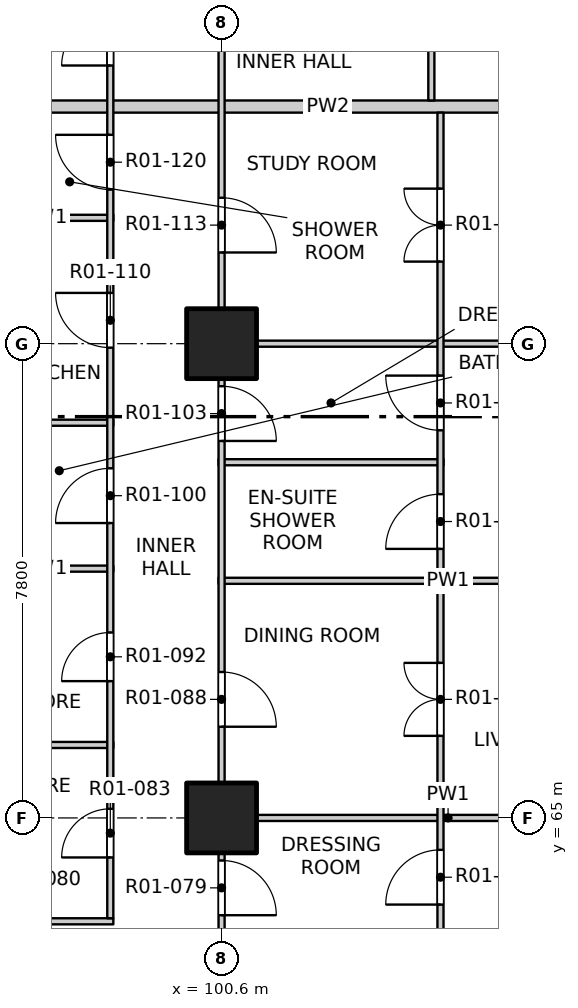
"""IFC4 building model, lengths in metres.
Left out: names, types, materials, properties, quantities, classifications, styles, units other than length and angle.
Written with IfcOpenShell. Run it as: python <this file> out.ifc"""

import sys

from ifc_helpers import new_model, si_unit, direction, frame, frame_2d, origin, origin_2d, place, context, subcontext, project, spatial, rectangle, extrude, element, fill, save


model = new_model("IFC4")
c1 = context("Model", 3, precision=1e-05, world=origin(), true_north=direction((0.0, 1.0)))
c2 = subcontext(c1, "Body", "Model", "MODEL_VIEW")
j1 = project(units=[si_unit("LENGTHUNIT", "METRE"), si_unit("PLANEANGLEUNIT", "RADIAN")], contexts=[c1])
p1 = place(None, origin())
s1 = spatial("IfcSite", under=j1, at=p1, CompositionType="ELEMENT")
p2 = place(p1, origin())
s2 = spatial("IfcBuilding", under=s1, at=p2, CompositionType="ELEMENT")
p3 = place(p2, frame((0.0, 0.0, 19.5)))
s3 = spatial("IfcBuildingStorey", under=s2, at=p3, CompositionType="ELEMENT", Elevation=19.5)
for number, where, z_axis, x_axis in (
    (1, (100.6, 65.0, -0.25), (0.0, 0.0, 1.0), (1.0, 0.0, 0.0)),
    (2, (100.6, 72.8, -0.25), (0.0, 0.0, 1.0), (1.0, 0.0, 0.0)),
):
    element("IfcColumn", number, at=place(p3, frame(where, z_axis=z_axis, x_axis=x_axis)), inside=s3, PredefinedType="COLUMN", context=c2, shape_type="SweptSolid", body=[
        extrude(rectangle(XDim=1.15, YDim=1.15, at=origin_2d()), origin(), (0.0, 0.0, 1.0), 3.4),
    ])
p4 = place(p3, frame((96.6, 63.3, 0.0), z_axis=(0.0, 0.0, 1.0), x_axis=(1.0, 0.0, 0.0)))
e3 = element("IfcWall", 3, at=p4, inside=s3, PredefinedType="PARTITIONING", context=c2, shape_type="SweptSolid", body=[
    extrude(rectangle(XDim=2.22, YDim=0.1, at=frame_2d((1.11, 0.0))), origin(), (0.0, 0.0, 1.0), 3.15),
])
p5 = place(p3, frame((100.55, 65.0, 0.0), z_axis=(0.0, 0.0, 1.0), x_axis=(1.0, 0.0, 0.0)))
e4 = element("IfcWall", 4, at=p5, inside=s3, PredefinedType="PARTITIONING", context=c2, shape_type="SweptSolid", body=[
    extrude(rectangle(XDim=7.55, YDim=0.1, at=frame_2d((3.775, 0.0))), origin(), (0.0, 0.0, 1.0), 2.55),
])
p6 = place(p3, frame((96.6, 66.2, 0.0), z_axis=(0.0, 0.0, 1.0), x_axis=(1.0, 0.0, 0.0)))
e5 = element("IfcWall", 5, at=p6, inside=s3, PredefinedType="PARTITIONING", context=c2, shape_type="SweptSolid", body=[
    extrude(rectangle(XDim=2.22, YDim=0.1, at=frame_2d((1.11, 0.0))), origin(), (0.0, 0.0, 1.0), 3.15),
])
p7 = place(p3, frame((100.55, 68.9, 0.0), z_axis=(0.0, 0.0, 1.0), x_axis=(1.0, 0.0, 0.0)))
e6 = element("IfcWall", 6, at=p7, inside=s3, PredefinedType="PARTITIONING", context=c2, shape_type="SweptSolid", body=[
    extrude(rectangle(XDim=7.55, YDim=0.1, at=frame_2d((3.775, 0.0))), origin(), (0.0, 0.0, 1.0), 3.15),
])
p8 = place(p3, frame((96.6, 69.1, 0.0), z_axis=(0.0, 0.0, 1.0), x_axis=(1.0, 0.0, 0.0)))
e7 = element("IfcWall", 7, at=p8, inside=s3, PredefinedType="PARTITIONING", context=c2, shape_type="SweptSolid", body=[
    extrude(rectangle(XDim=2.22, YDim=0.1, at=frame_2d((1.11, 0.0))), origin(), (0.0, 0.0, 1.0), 3.15),
])
p9 = place(p3, frame((100.55, 70.85, 0.0), z_axis=(0.0, 0.0, 1.0), x_axis=(1.0, 0.0, 0.0)))
e8 = element("IfcWall", 8, at=p9, inside=s3, PredefinedType="PARTITIONING", context=c2, shape_type="SweptSolid", body=[
    extrude(rectangle(XDim=3.7, YDim=0.1, at=frame_2d((1.85, 0.0))), origin(), (0.0, 0.0, 1.0), 3.15),
])
p10 = place(p3, frame((96.6, 71.5, 0.0), z_axis=(0.0, 0.0, 1.0), x_axis=(1.0, 0.0, 0.0)))
e9 = element("IfcWall", 9, at=p10, inside=s3, PredefinedType="PARTITIONING", context=c2, shape_type="SweptSolid", body=[
    extrude(rectangle(XDim=2.22, YDim=0.1, at=frame_2d((1.11, 0.0))), origin(), (0.0, 0.0, 1.0), 3.15),
])
p11 = place(p3, frame((100.55, 72.8, 0.0), z_axis=(0.0, 0.0, 1.0), x_axis=(1.0, 0.0, 0.0)))
e10 = element("IfcWall", 10, at=p11, inside=s3, PredefinedType="PARTITIONING", context=c2, shape_type="SweptSolid", body=[
    extrude(rectangle(XDim=7.55, YDim=0.1, at=frame_2d((3.775, 0.0))), origin(), (0.0, 0.0, 1.0), 2.55),
])
p12 = place(p3, frame((96.6, 74.87, 0.0), z_axis=(0.0, 0.0, 1.0), x_axis=(1.0, 0.0, 0.0)))
e11 = element("IfcWall", 11, at=p12, inside=s3, PredefinedType="PARTITIONING", context=c2, shape_type="SweptSolid", body=[
    extrude(rectangle(XDim=2.22, YDim=0.1, at=frame_2d((1.11, 0.0))), origin(), (0.0, 0.0, 1.0), 3.15),
])
p13 = place(p3, frame((96.6, 76.7, 0.0), z_axis=(0.0, 0.0, 1.0), x_axis=(1.0, 0.0, 0.0)))
e12 = element("IfcWall", 12, at=p13, inside=s3, PredefinedType="PARTITIONING", context=c2, shape_type="SweptSolid", body=[
    extrude(rectangle(XDim=11.5, YDim=0.2, at=frame_2d((5.75, 0.0))), origin(), (0.0, 0.0, 1.0), 3.15),
])
p14 = place(p3, frame((98.77, 63.35, 0.0), z_axis=(0.0, 0.0, 1.0), x_axis=(0.0, 1.0, 0.0)))
e13 = element("IfcWall", 13, at=p14, inside=s3, PredefinedType="PARTITIONING", context=c2, shape_type="SweptSolid", body=[
    extrude(rectangle(XDim=17.7, YDim=0.1, at=frame_2d((8.85, 0.0))), origin(), (0.0, 0.0, 1.0), 3.15),
])
p15 = place(p14, frame((1.0, 0.0, 0.0)))
e14 = element("IfcOpeningElement", 14, at=p15, cuts=e13, PredefinedType="OPENING", context=c2, shape_type="SweptSolid", body=[
    extrude(rectangle(XDim=0.8, YDim=2.1, at=frame_2d((0.4, 1.05))), frame((0.0, 0.06, 0.0), z_axis=(0.0, -1.0, 0.0), x_axis=(1.0, 0.0, 0.0)), (0.0, 0.0, 1.0), 0.12),
])
p16 = place(p14, frame((3.9, 0.0, 0.0)))
e15 = element("IfcOpeningElement", 15, at=p16, cuts=e13, PredefinedType="OPENING", context=c2, shape_type="SweptSolid", body=[
    extrude(rectangle(XDim=0.8, YDim=2.1, at=frame_2d((0.4, 1.05))), frame((0.0, 0.06, 0.0), z_axis=(0.0, -1.0, 0.0), x_axis=(1.0, 0.0, 0.0)), (0.0, 0.0, 1.0), 0.12),
])
p17 = place(p14, frame((6.5, 0.0, 0.0)))
e16 = element("IfcOpeningElement", 16, at=p17, cuts=e13, PredefinedType="OPENING", context=c2, shape_type="SweptSolid", body=[
    extrude(rectangle(XDim=0.9, YDim=2.1, at=frame_2d((0.45, 1.05))), frame((0.0, 0.06, 0.0), z_axis=(0.0, -1.0, 0.0), x_axis=(1.0, 0.0, 0.0)), (0.0, 0.0, 1.0), 0.12),
])
p18 = place(p14, frame((9.385, 0.0, 0.0)))
e17 = element("IfcOpeningElement", 17, at=p18, cuts=e13, PredefinedType="OPENING", context=c2, shape_type="SweptSolid", body=[
    extrude(rectangle(XDim=0.9, YDim=2.1, at=frame_2d((0.45, 1.05))), frame((0.0, 0.06, 0.0), z_axis=(0.0, -1.0, 0.0), x_axis=(1.0, 0.0, 0.0)), (0.0, 0.0, 1.0), 0.12),
])
p19 = place(p14, frame((11.985, 0.0, 0.0)))
e18 = element("IfcOpeningElement", 18, at=p19, cuts=e13, PredefinedType="OPENING", context=c2, shape_type="SweptSolid", body=[
    extrude(rectangle(XDim=0.9, YDim=2.1, at=frame_2d((0.45, 1.05))), frame((0.0, 0.06, 0.0), z_axis=(0.0, -1.0, 0.0), x_axis=(1.0, 0.0, 0.0)), (0.0, 0.0, 1.0), 0.12),
])
p20 = place(p14, frame((14.025, 0.0, 0.0)))
e19 = element("IfcOpeningElement", 19, at=p20, cuts=e13, PredefinedType="OPENING", context=c2, shape_type="SweptSolid", body=[
    extrude(rectangle(XDim=0.8, YDim=2.1, at=frame_2d((0.4, 1.05))), frame((0.0, 0.06, 0.0), z_axis=(0.0, -1.0, 0.0), x_axis=(1.0, 0.0, 0.0)), (0.0, 0.0, 1.0), 0.12),
])
p21 = place(p14, frame((16.175, 0.0, 0.0)))
e20 = element("IfcOpeningElement", 20, at=p21, cuts=e13, PredefinedType="OPENING", context=c2, shape_type="SweptSolid", body=[
    extrude(rectangle(XDim=0.9, YDim=2.1, at=frame_2d((0.45, 1.05))), frame((0.0, 0.06, 0.0), z_axis=(0.0, -1.0, 0.0), x_axis=(1.0, 0.0, 0.0)), (0.0, 0.0, 1.0), 0.12),
])
p22 = place(p3, frame((100.6, 49.4, 0.0), z_axis=(0.0, 0.0, 1.0), x_axis=(0.0, 1.0, 0.0)))
e21 = element("IfcWall", 21, at=p22, inside=s3, PredefinedType="PARTITIONING", context=c2, shape_type="SweptSolid", body=[
    extrude(rectangle(XDim=31.2, YDim=0.1, at=frame_2d((15.6, 0.0))), origin(), (0.0, 0.0, 1.0), 3.15),
])
p23 = place(p22, frame((1.5, 0.0, 0.0)))
e22 = element("IfcOpeningElement", 22, at=p23, cuts=e21, PredefinedType="OPENING", context=c2, shape_type="SweptSolid", body=[
    extrude(rectangle(XDim=0.9, YDim=2.1, at=frame_2d((0.45, 1.05))), frame((0.0, 0.06, 0.0), z_axis=(0.0, -1.0, 0.0), x_axis=(1.0, 0.0, 0.0)), (0.0, 0.0, 1.0), 0.12),
])
p24 = place(p22, frame((5.4, 0.0, 0.0)))
e23 = element("IfcOpeningElement", 23, at=p24, cuts=e21, PredefinedType="OPENING", context=c2, shape_type="SweptSolid", body=[
    extrude(rectangle(XDim=0.9, YDim=2.1, at=frame_2d((0.45, 1.05))), frame((0.0, 0.06, 0.0), z_axis=(0.0, -1.0, 0.0), x_axis=(1.0, 0.0, 0.0)), (0.0, 0.0, 1.0), 0.12),
])
p25 = place(p22, frame((10.275, 0.0, 0.0)))
e24 = element("IfcOpeningElement", 24, at=p25, cuts=e21, PredefinedType="OPENING", context=c2, shape_type="SweptSolid", body=[
    extrude(rectangle(XDim=0.9, YDim=2.1, at=frame_2d((0.45, 1.05))), frame((0.0, 0.06, 0.0), z_axis=(0.0, -1.0, 0.0), x_axis=(1.0, 0.0, 0.0)), (0.0, 0.0, 1.0), 0.12),
])
p26 = place(p22, frame((14.0, 0.0, 0.0)))
e25 = element("IfcOpeningElement", 25, at=p26, cuts=e21, PredefinedType="OPENING", context=c2, shape_type="SweptSolid", body=[
    extrude(rectangle(XDim=0.9, YDim=2.1, at=frame_2d((0.45, 1.05))), frame((0.0, 0.06, 0.0), z_axis=(0.0, -1.0, 0.0), x_axis=(1.0, 0.0, 0.0)), (0.0, 0.0, 1.0), 0.12),
])
p27 = place(p22, frame((17.1, 0.0, 0.0)))
e26 = element("IfcOpeningElement", 26, at=p27, cuts=e21, PredefinedType="OPENING", context=c2, shape_type="SweptSolid", body=[
    extrude(rectangle(XDim=0.9, YDim=2.1, at=frame_2d((0.45, 1.05))), frame((0.0, 0.06, 0.0), z_axis=(0.0, -1.0, 0.0), x_axis=(1.0, 0.0, 0.0)), (0.0, 0.0, 1.0), 0.12),
])
p28 = place(p22, frame((21.8, 0.0, 0.0)))
e27 = element("IfcOpeningElement", 27, at=p28, cuts=e21, PredefinedType="OPENING", context=c2, shape_type="SweptSolid", body=[
    extrude(rectangle(XDim=0.9, YDim=2.1, at=frame_2d((0.45, 1.05))), frame((0.0, 0.06, 0.0), z_axis=(0.0, -1.0, 0.0), x_axis=(1.0, 0.0, 0.0)), (0.0, 0.0, 1.0), 0.12),
])
p29 = place(p22, frame((24.9, 0.0, 0.0)))
e28 = element("IfcOpeningElement", 28, at=p29, cuts=e21, PredefinedType="OPENING", context=c2, shape_type="SweptSolid", body=[
    extrude(rectangle(XDim=0.9, YDim=2.1, at=frame_2d((0.45, 1.05))), frame((0.0, 0.06, 0.0), z_axis=(0.0, -1.0, 0.0), x_axis=(1.0, 0.0, 0.0)), (0.0, 0.0, 1.0), 0.12),
])
p30 = place(p22, frame((28.8, 0.0, 0.0)))
e29 = element("IfcOpeningElement", 29, at=p30, cuts=e21, PredefinedType="OPENING", context=c2, shape_type="SweptSolid", body=[
    extrude(rectangle(XDim=0.9, YDim=2.1, at=frame_2d((0.45, 1.05))), frame((0.0, 0.06, 0.0), z_axis=(0.0, -1.0, 0.0), x_axis=(1.0, 0.0, 0.0)), (0.0, 0.0, 1.0), 0.12),
])
p31 = place(p3, frame((104.05, 76.8, 0.0), z_axis=(0.0, 0.0, 1.0), x_axis=(0.0, 1.0, 0.0)))
e30 = element("IfcWall", 30, at=p31, inside=s3, PredefinedType="PARTITIONING", context=c2, shape_type="SweptSolid", body=[
    extrude(rectangle(XDim=11.3, YDim=0.1, at=frame_2d((5.65, 0.0))), origin(), (0.0, 0.0, 1.0), 3.15),
])
p32 = place(p31, frame((1.25, 0.0, 0.0)))
e31 = element("IfcOpeningElement", 31, at=p32, cuts=e30, PredefinedType="OPENING", context=c2, shape_type="SweptSolid", body=[
    extrude(rectangle(XDim=1.2, YDim=2.1, at=frame_2d((0.6, 1.05))), frame((0.0, 0.06, 0.0), z_axis=(0.0, -1.0, 0.0), x_axis=(1.0, 0.0, 0.0)), (0.0, 0.0, 1.0), 0.12),
])
p33 = place(p31, frame((5.15, 0.0, 0.0)))
e32 = element("IfcOpeningElement", 32, at=p33, cuts=e30, PredefinedType="OPENING", context=c2, shape_type="SweptSolid", body=[
    extrude(rectangle(XDim=1.2, YDim=2.1, at=frame_2d((0.6, 1.05))), frame((0.0, 0.06, 0.0), z_axis=(0.0, -1.0, 0.0), x_axis=(1.0, 0.0, 0.0)), (0.0, 0.0, 1.0), 0.12),
])
p34 = place(p31, frame((9.05, 0.0, 0.0)))
e33 = element("IfcOpeningElement", 33, at=p34, cuts=e30, PredefinedType="OPENING", context=c2, shape_type="SweptSolid", body=[
    extrude(rectangle(XDim=1.2, YDim=2.1, at=frame_2d((0.6, 1.05))), frame((0.0, 0.06, 0.0), z_axis=(0.0, -1.0, 0.0), x_axis=(1.0, 0.0, 0.0)), (0.0, 0.0, 1.0), 0.12),
])
p35 = place(p3, frame((104.2, 61.2, 0.0), z_axis=(0.0, 0.0, 1.0), x_axis=(0.0, 1.0, 0.0)))
e34 = element("IfcWall", 34, at=p35, inside=s3, PredefinedType="PARTITIONING", context=c2, shape_type="SweptSolid", body=[
    extrude(rectangle(XDim=15.4, YDim=0.1, at=frame_2d((7.7, 0.0))), origin(), (0.0, 0.0, 1.0), 3.15),
])
p36 = place(p35, frame((0.425, 0.0, 0.0)))
e35 = element("IfcOpeningElement", 35, at=p36, cuts=e34, PredefinedType="OPENING", context=c2, shape_type="SweptSolid", body=[
    extrude(rectangle(XDim=0.9, YDim=2.1, at=frame_2d((0.45, 1.05))), frame((0.0, 0.06, 0.0), z_axis=(0.0, -1.0, 0.0), x_axis=(1.0, 0.0, 0.0)), (0.0, 0.0, 1.0), 0.12),
])
p37 = place(p35, frame((2.375, 0.0, 0.0)))
e36 = element("IfcOpeningElement", 36, at=p37, cuts=e34, PredefinedType="OPENING", context=c2, shape_type="SweptSolid", body=[
    extrude(rectangle(XDim=0.9, YDim=2.1, at=frame_2d((0.45, 1.05))), frame((0.0, 0.06, 0.0), z_axis=(0.0, -1.0, 0.0), x_axis=(1.0, 0.0, 0.0)), (0.0, 0.0, 1.0), 0.12),
])
p38 = place(p35, frame((5.15, 0.0, 0.0)))
e37 = element("IfcOpeningElement", 37, at=p38, cuts=e34, PredefinedType="OPENING", context=c2, shape_type="SweptSolid", body=[
    extrude(rectangle(XDim=1.2, YDim=2.1, at=frame_2d((0.6, 1.05))), frame((0.0, 0.06, 0.0), z_axis=(0.0, -1.0, 0.0), x_axis=(1.0, 0.0, 0.0)), (0.0, 0.0, 1.0), 0.12),
])
p39 = place(p35, frame((8.225, 0.0, 0.0)))
e38 = element("IfcOpeningElement", 38, at=p39, cuts=e34, PredefinedType="OPENING", context=c2, shape_type="SweptSolid", body=[
    extrude(rectangle(XDim=0.9, YDim=2.1, at=frame_2d((0.45, 1.05))), frame((0.0, 0.06, 0.0), z_axis=(0.0, -1.0, 0.0), x_axis=(1.0, 0.0, 0.0)), (0.0, 0.0, 1.0), 0.12),
])
p40 = place(p35, frame((10.175, 0.0, 0.0)))
e39 = element("IfcOpeningElement", 39, at=p40, cuts=e34, PredefinedType="OPENING", context=c2, shape_type="SweptSolid", body=[
    extrude(rectangle(XDim=0.9, YDim=2.1, at=frame_2d((0.45, 1.05))), frame((0.0, 0.06, 0.0), z_axis=(0.0, -1.0, 0.0), x_axis=(1.0, 0.0, 0.0)), (0.0, 0.0, 1.0), 0.12),
])
p41 = place(p35, frame((12.95, 0.0, 0.0)))
e40 = element("IfcOpeningElement", 40, at=p41, cuts=e34, PredefinedType="OPENING", context=c2, shape_type="SweptSolid", body=[
    extrude(rectangle(XDim=1.2, YDim=2.1, at=frame_2d((0.6, 1.05))), frame((0.0, 0.06, 0.0), z_axis=(0.0, -1.0, 0.0), x_axis=(1.0, 0.0, 0.0)), (0.0, 0.0, 1.0), 0.12),
])
p42 = place(p26, origin())
e41 = element("IfcDoor", 41, at=p42, inside=s3, OperationType="SINGLE_SWING_RIGHT", PredefinedType="DOOR", context=c2, shape_type="SweptSolid", body=[
    extrude(rectangle(XDim=0.9, YDim=2.1, at=frame_2d((0.45, 1.05))), frame((0.0, 0.025, 0.0), z_axis=(0.0, -1.0, 0.0), x_axis=(1.0, 0.0, 0.0)), (0.0, 0.0, 1.0), 0.05),
])
fill(e25, e41)
p43 = place(p37, origin())
e42 = element("IfcDoor", 42, at=p43, inside=s3, OperationType="SINGLE_SWING_LEFT", PredefinedType="DOOR", context=c2, shape_type="SweptSolid", body=[
    extrude(rectangle(XDim=0.9, YDim=2.1, at=frame_2d((0.45, 1.05))), frame((0.0, 0.025, 0.0), z_axis=(0.0, -1.0, 0.0), x_axis=(1.0, 0.0, 0.0)), (0.0, 0.0, 1.0), 0.05),
])
fill(e36, e42)
p44 = place(p15, origin())
e43 = element("IfcDoor", 43, at=p44, inside=s3, OperationType="SINGLE_SWING_LEFT", PredefinedType="DOOR", context=c2, shape_type="SweptSolid", body=[
    extrude(rectangle(XDim=0.8, YDim=2.1, at=frame_2d((0.4, 1.05))), frame((0.0, 0.025, 0.0), z_axis=(0.0, -1.0, 0.0), x_axis=(1.0, 0.0, 0.0)), (0.0, 0.0, 1.0), 0.05),
])
fill(e14, e43)
p45 = place(p27, origin())
e44 = element("IfcDoor", 44, at=p45, inside=s3, OperationType="SINGLE_SWING_RIGHT", PredefinedType="DOOR", context=c2, shape_type="SweptSolid", body=[
    extrude(rectangle(XDim=0.9, YDim=2.1, at=frame_2d((0.45, 1.05))), frame((0.0, 0.025, 0.0), z_axis=(0.0, -1.0, 0.0), x_axis=(1.0, 0.0, 0.0)), (0.0, 0.0, 1.0), 0.05),
])
fill(e26, e44)
p46 = place(p38, origin())
e45 = element("IfcDoor", 45, at=p46, inside=s3, OperationType="DOUBLE_DOOR_SINGLE_SWING", PredefinedType="DOOR", context=c2, shape_type="SweptSolid", body=[
    extrude(rectangle(XDim=1.2, YDim=2.1, at=frame_2d((0.6, 1.05))), frame((0.0, 0.025, 0.0), z_axis=(0.0, -1.0, 0.0), x_axis=(1.0, 0.0, 0.0)), (0.0, 0.0, 1.0), 0.05),
])
fill(e37, e45)
p47 = place(p16, origin())
e46 = element("IfcDoor", 46, at=p47, inside=s3, OperationType="SINGLE_SWING_LEFT", PredefinedType="DOOR", context=c2, shape_type="SweptSolid", body=[
    extrude(rectangle(XDim=0.8, YDim=2.1, at=frame_2d((0.4, 1.05))), frame((0.0, 0.025, 0.0), z_axis=(0.0, -1.0, 0.0), x_axis=(1.0, 0.0, 0.0)), (0.0, 0.0, 1.0), 0.05),
])
fill(e15, e46)
p48 = place(p39, origin())
e47 = element("IfcDoor", 47, at=p48, inside=s3, OperationType="SINGLE_SWING_LEFT", PredefinedType="DOOR", context=c2, shape_type="SweptSolid", body=[
    extrude(rectangle(XDim=0.9, YDim=2.1, at=frame_2d((0.45, 1.05))), frame((0.0, 0.025, 0.0), z_axis=(0.0, -1.0, 0.0), x_axis=(1.0, 0.0, 0.0)), (0.0, 0.0, 1.0), 0.05),
])
fill(e38, e47)
p49 = place(p17, origin())
e48 = element("IfcDoor", 48, at=p49, inside=s3, OperationType="SINGLE_SWING_LEFT", PredefinedType="DOOR", context=c2, shape_type="SweptSolid", body=[
    extrude(rectangle(XDim=0.9, YDim=2.1, at=frame_2d((0.45, 1.05))), frame((0.0, 0.025, 0.0), z_axis=(0.0, -1.0, 0.0), x_axis=(1.0, 0.0, 0.0)), (0.0, 0.0, 1.0), 0.05),
])
fill(e16, e48)
p50 = place(p28, origin())
e49 = element("IfcDoor", 49, at=p50, inside=s3, OperationType="SINGLE_SWING_RIGHT", PredefinedType="DOOR", context=c2, shape_type="SweptSolid", body=[
    extrude(rectangle(XDim=0.9, YDim=2.1, at=frame_2d((0.45, 1.05))), frame((0.0, 0.025, 0.0), z_axis=(0.0, -1.0, 0.0), x_axis=(1.0, 0.0, 0.0)), (0.0, 0.0, 1.0), 0.05),
])
fill(e27, e49)
p51 = place(p40, origin())
e50 = element("IfcDoor", 50, at=p51, inside=s3, OperationType="SINGLE_SWING_RIGHT", PredefinedType="DOOR", context=c2, shape_type="SweptSolid", body=[
    extrude(rectangle(XDim=0.9, YDim=2.1, at=frame_2d((0.45, 1.05))), frame((0.0, 0.025, 0.0), z_axis=(0.0, -1.0, 0.0), x_axis=(1.0, 0.0, 0.0)), (0.0, 0.0, 1.0), 0.05),
])
fill(e39, e50)
p52 = place(p18, origin())
e51 = element("IfcDoor", 51, at=p52, inside=s3, OperationType="SINGLE_SWING_RIGHT", PredefinedType="DOOR", context=c2, shape_type="SweptSolid", body=[
    extrude(rectangle(XDim=0.9, YDim=2.1, at=frame_2d((0.45, 1.05))), frame((0.0, 0.025, 0.0), z_axis=(0.0, -1.0, 0.0), x_axis=(1.0, 0.0, 0.0)), (0.0, 0.0, 1.0), 0.05),
])
fill(e17, e51)
p53 = place(p29, origin())
e52 = element("IfcDoor", 52, at=p53, inside=s3, OperationType="SINGLE_SWING_RIGHT", PredefinedType="DOOR", context=c2, shape_type="SweptSolid", body=[
    extrude(rectangle(XDim=0.9, YDim=2.1, at=frame_2d((0.45, 1.05))), frame((0.0, 0.025, 0.0), z_axis=(0.0, -1.0, 0.0), x_axis=(1.0, 0.0, 0.0)), (0.0, 0.0, 1.0), 0.05),
])
fill(e28, e52)
p54 = place(p41, origin())
e53 = element("IfcDoor", 53, at=p54, inside=s3, OperationType="DOUBLE_DOOR_SINGLE_SWING", PredefinedType="DOOR", context=c2, shape_type="SweptSolid", body=[
    extrude(rectangle(XDim=1.2, YDim=2.1, at=frame_2d((0.6, 1.05))), frame((0.0, 0.025, 0.0), z_axis=(0.0, -1.0, 0.0), x_axis=(1.0, 0.0, 0.0)), (0.0, 0.0, 1.0), 0.05),
])
fill(e40, e53)
p55 = place(p19, origin())
e54 = element("IfcDoor", 54, at=p55, inside=s3, OperationType="SINGLE_SWING_RIGHT", PredefinedType="DOOR", context=c2, shape_type="SweptSolid", body=[
    extrude(rectangle(XDim=0.9, YDim=2.1, at=frame_2d((0.45, 1.05))), frame((0.0, 0.025, 0.0), z_axis=(0.0, -1.0, 0.0), x_axis=(1.0, 0.0, 0.0)), (0.0, 0.0, 1.0), 0.05),
])
fill(e18, e54)
p56 = place(p20, origin())
e55 = element("IfcDoor", 55, at=p56, inside=s3, OperationType="SINGLE_SWING_LEFT", PredefinedType="DOOR", context=c2, shape_type="SweptSolid", body=[
    extrude(rectangle(XDim=0.8, YDim=2.1, at=frame_2d((0.4, 1.05))), frame((0.0, 0.025, 0.0), z_axis=(0.0, -1.0, 0.0), x_axis=(1.0, 0.0, 0.0)), (0.0, 0.0, 1.0), 0.05),
])
fill(e19, e55)
save(model, sys.argv[1])
